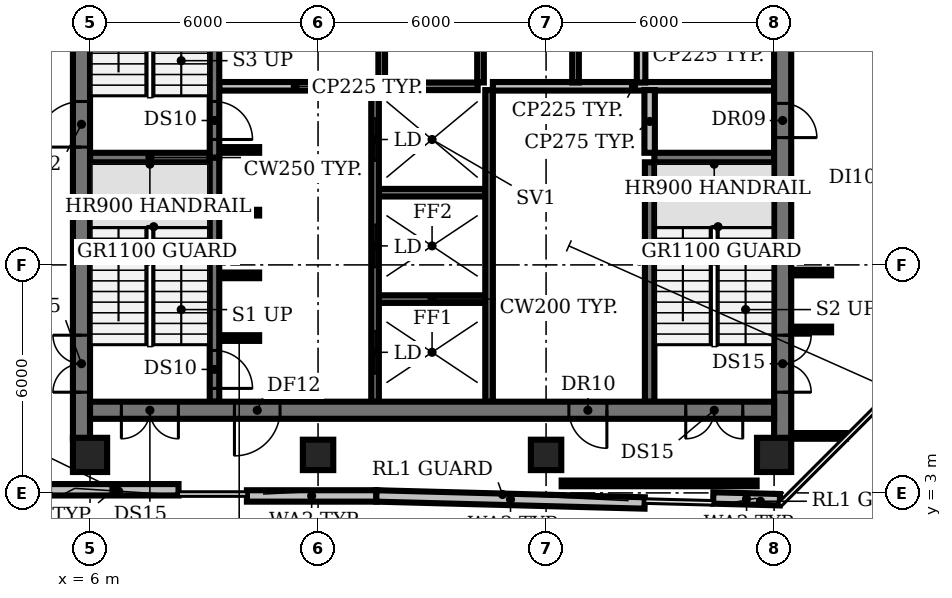
"""IFC4 building model, lengths in metres.
Left out: names, types, materials, properties, quantities, classifications, styles, units other than length and angle.
Written with IfcOpenShell. Run it as: python <this file> out.ifc"""

import sys

from ifc_helpers import new_model, si_unit, direction, frame, frame_2d, origin, origin_2d, place, context, subcontext, project, spatial, rectangle, circle, extrude, element, fill, save


model = new_model("IFC4")
c1 = context("Model", 3, precision=1e-05, world=origin(), true_north=direction((0.0, 1.0)))
c2 = subcontext(c1, "Body", "Model", "MODEL_VIEW")
j1 = project(units=[si_unit("LENGTHUNIT", "METRE"), si_unit("PLANEANGLEUNIT", "RADIAN")], contexts=[c1])
p1 = place(None, origin())
s1 = spatial("IfcSite", under=j1, at=p1, CompositionType="ELEMENT")
p2 = place(p1, origin())
s2 = spatial("IfcBuilding", under=s1, at=p2, CompositionType="ELEMENT")
p3 = place(p2, frame((0.0, 0.0, 234.8)))
s3 = spatial("IfcBuildingStorey", under=s2, at=p3, CompositionType="ELEMENT", Elevation=234.8)
p4 = place(p3, frame((6.0, 4.0, 0.0), z_axis=(0.0, 0.0, 1.0), x_axis=(1.0, 0.0, 0.0)))
e1 = element("IfcColumn", 1, at=p4, inside=s3, PredefinedType="COLUMN", context=c2, shape_type="SweptSolid", body=[
    extrude(circle(Radius=0.45, at=origin_2d()), origin(), (0.0, 0.0, 1.0), 3.85),
])
for number, where, z_axis, x_axis in (
    (2, (12.0, 4.0, 0.0), (0.0, 0.0, 1.0), (1.0, 0.0, 0.0)),
    (3, (18.0, 4.0, 0.0), (0.0, 0.0, 1.0), (1.0, 0.0, 0.0)),
):
    element("IfcColumn", number, at=place(p3, frame(where, z_axis=z_axis, x_axis=x_axis)), inside=s3, PredefinedType="COLUMN", context=c2, shape_type="SweptSolid", body=[
        extrude(rectangle(XDim=0.8, YDim=0.8, at=origin_2d()), origin(), (0.0, 0.0, 1.0), 3.85),
    ])
p5 = place(p3, frame((24.0, 4.0, 0.0), z_axis=(0.0, 0.0, 1.0), x_axis=(1.0, 0.0, 0.0)))
e4 = element("IfcColumn", 4, at=p5, inside=s3, PredefinedType="COLUMN", context=c2, shape_type="SweptSolid", body=[
    extrude(circle(Radius=0.45, at=origin_2d()), origin(), (0.0, 0.0, 1.0), 3.85),
])
p6 = place(p3, frame((4.921, 3.083, 0.0), z_axis=(0.0, 0.0, 1.0), x_axis=(1.0, 0.0, 0.0)))
e5 = element("IfcWall", 5, at=p6, inside=s3, PredefinedType="SOLIDWALL", context=c2, shape_type="SweptSolid", body=[
    extrude(rectangle(XDim=3.407, YDim=0.3, at=frame_2d((1.704, 0.0))), origin(), (0.0, 0.0, 1.0), 3.85),
])
p7 = place(p3, frame((10.128, 2.92, 0.0), z_axis=(0.0, 0.0, 1.0), x_axis=(1.0, 0.0, 0.0)))
e6 = element("IfcWall", 6, at=p7, inside=s3, PredefinedType="SOLIDWALL", context=c2, shape_type="SweptSolid", body=[
    extrude(rectangle(XDim=3.407, YDim=0.3, at=frame_2d((1.704, 0.0))), origin(), (0.0, 0.0, 1.0), 3.85),
])
p8 = place(p3, frame((13.534, 2.92, 0.0), z_axis=(0.0, 0.0, 1.0), x_axis=(0.999657569766, -0.026167598475, 0.0)))
e7 = element("IfcWall", 7, at=p8, inside=s3, PredefinedType="SOLIDWALL", context=c2, shape_type="SweptSolid", body=[
    extrude(rectangle(XDim=7.063, YDim=0.3, at=frame_2d((3.531, 0.0))), origin(), (0.0, 0.0, 1.0), 3.85),
])
p9 = place(p3, frame((22.398, 2.867, 0.0), z_axis=(0.0, 0.0, 1.0), x_axis=(0.999657665307, -0.026163948361, 0.0)))
e8 = element("IfcWall", 8, at=p9, inside=s3, PredefinedType="SOLIDWALL", context=c2, shape_type="SweptSolid", body=[
    extrude(rectangle(XDim=1.754, YDim=0.3, at=frame_2d((0.877, 0.0))), origin(), (0.0, 0.0, 1.0), 3.85),
])
p10 = place(p3, frame((9.4, 7.075, 0.0), z_axis=(0.0, 0.0, 1.0), x_axis=(1.0, 0.0, 0.0)))
e9 = element("IfcWall", 9, at=p10, inside=s3, PredefinedType="SHEAR", context=c2, shape_type="SweptSolid", body=[
    extrude(rectangle(XDim=1.05, YDim=0.15, at=frame_2d((0.525, 0.0))), origin(), (0.0, 0.0, 1.0), 3.85),
])
p11 = place(p3, frame((13.6, 8.1, 0.0), z_axis=(0.0, 0.0, 1.0), x_axis=(1.0, 0.0, 0.0)))
e10 = element("IfcWall", 10, at=p11, inside=s3, PredefinedType="SHEAR", context=c2, shape_type="SweptSolid", body=[
    extrude(rectangle(XDim=2.8, YDim=0.2, at=frame_2d((1.4, 0.0))), origin(), (0.0, 0.0, 1.0), 3.85),
])
for number, where, z_axis, x_axis in (
    (11, (9.4, 8.725, 0.0), (0.0, 0.0, 1.0), (1.0, 0.0, 0.0)),
    (12, (9.4, 10.375, 0.0), (0.0, 0.0, 1.0), (1.0, 0.0, 0.0)),
):
    element("IfcWall", number, at=place(p3, frame(where, z_axis=z_axis, x_axis=x_axis)), inside=s3, PredefinedType="SHEAR", context=c2, shape_type="SweptSolid", body=[
        extrude(rectangle(XDim=1.05, YDim=0.15, at=frame_2d((0.525, 0.0))), origin(), (0.0, 0.0, 1.0), 3.85),
    ])
p12 = place(p3, frame((13.6, 10.9, 0.0), z_axis=(0.0, 0.0, 1.0), x_axis=(1.0, 0.0, 0.0)))
e13 = element("IfcWall", 13, at=p12, inside=s3, PredefinedType="SHEAR", context=c2, shape_type="SweptSolid", body=[
    extrude(rectangle(XDim=2.8, YDim=0.2, at=frame_2d((1.4, 0.0))), origin(), (0.0, 0.0, 1.0), 3.85),
])
for number, where, z_axis, x_axis in (
    (14, (6.0, 11.825, 0.0), (0.0, 0.0, 1.0), (1.0, 0.0, 0.0)),
    (15, (20.85, 11.825, 0.0), (0.0, 0.0, 1.0), (1.0, 0.0, 0.0)),
):
    element("IfcWall", number, at=place(p3, frame(where, z_axis=z_axis, x_axis=x_axis)), inside=s3, PredefinedType="SHEAR", context=c2, shape_type="SweptSolid", body=[
        extrude(rectangle(XDim=3.15, YDim=0.25, at=frame_2d((1.575, 0.0))), origin(), (0.0, 0.0, 1.0), 3.85),
    ])
p13 = place(p3, frame((9.4, 12.025, 0.0), z_axis=(0.0, 0.0, 1.0), x_axis=(1.0, 0.0, 0.0)))
e16 = element("IfcWall", 16, at=p13, inside=s3, PredefinedType="SHEAR", context=c2, shape_type="SweptSolid", body=[
    extrude(rectangle(XDim=1.05, YDim=0.15, at=frame_2d((0.525, 0.0))), origin(), (0.0, 0.0, 1.0), 3.85),
])
p14 = place(p3, frame((9.4, 13.7, 0.0), z_axis=(0.0, 0.0, 1.0), x_axis=(1.0, 0.0, 0.0)))
e17 = element("IfcWall", 17, at=p14, inside=s3, PredefinedType="PARTITIONING", context=c2, shape_type="SweptSolid", body=[
    extrude(rectangle(XDim=4.0, YDim=0.225, at=frame_2d((2.0, 0.0))), origin(), (0.0, 0.0, 1.0), 3.85),
])
p15 = place(p3, frame((13.75, 13.7, 0.0), z_axis=(0.0, 0.0, 1.0), x_axis=(1.0, 0.0, 0.0)))
e18 = element("IfcWall", 18, at=p15, inside=s3, PredefinedType="SHEAR", context=c2, shape_type="SweptSolid", body=[
    extrude(rectangle(XDim=2.45, YDim=0.2, at=frame_2d((1.225, 0.0))), origin(), (0.0, 0.0, 1.0), 3.85),
])
p16 = place(p3, frame((16.6, 13.7, 0.0), z_axis=(0.0, 0.0, 1.0), x_axis=(1.0, 0.0, 0.0)))
e19 = element("IfcWall", 19, at=p16, inside=s3, PredefinedType="PARTITIONING", context=c2, shape_type="SweptSolid", body=[
    extrude(rectangle(XDim=7.4, YDim=0.225, at=frame_2d((3.7, 0.0))), origin(), (0.0, 0.0, 1.0), 3.85),
])
p17 = place(p3, frame((9.275, 11.825, 0.0), z_axis=(0.0, 0.0, 1.0), x_axis=(0.0, -1.0, 0.0)))
e20 = element("IfcWall", 20, at=p17, inside=s3, PredefinedType="SHEAR", context=c2, shape_type="SweptSolid", body=[
    extrude(rectangle(XDim=6.425, YDim=0.25, at=frame_2d((3.212, 0.0))), origin(), (0.0, 0.0, 1.0), 3.85),
])
p18 = place(p17, frame((5.075, 0.0, 0.0)))
e21 = element("IfcOpeningElement", 21, at=p18, cuts=e20, PredefinedType="OPENING", context=c2, shape_type="SweptSolid", body=[
    extrude(rectangle(XDim=1.0, YDim=2.1, at=frame_2d((0.5, 1.05))), frame((0.0, 0.135, 0.0), z_axis=(0.0, -1.0, 0.0), x_axis=(1.0, 0.0, 0.0)), (0.0, 0.0, 1.0), 0.27),
])
p19 = place(p3, frame((9.275, 18.375, 0.0), z_axis=(0.0, 0.0, 1.0), x_axis=(0.0, -1.0, 0.0)))
e22 = element("IfcWall", 22, at=p19, inside=s3, PredefinedType="SHEAR", context=c2, shape_type="SweptSolid", body=[
    extrude(rectangle(XDim=6.55, YDim=0.25, at=frame_2d((3.275, 0.0))), origin(), (0.0, 0.0, 1.0), 3.85),
])
p20 = place(p19, frame((5.075, 0.0, 0.0)))
e23 = element("IfcOpeningElement", 23, at=p20, cuts=e22, PredefinedType="OPENING", context=c2, shape_type="SweptSolid", body=[
    extrude(rectangle(XDim=1.0, YDim=2.1, at=frame_2d((0.5, 1.05))), frame((0.0, 0.135, 0.0), z_axis=(0.0, -1.0, 0.0), x_axis=(1.0, 0.0, 0.0)), (0.0, 0.0, 1.0), 0.27),
])
p21 = place(p3, frame((13.5, 5.4, 0.0), z_axis=(0.0, 0.0, 1.0), x_axis=(0.0, 1.0, 0.0)))
e24 = element("IfcWall", 24, at=p21, inside=s3, PredefinedType="SHEAR", context=c2, shape_type="SweptSolid", body=[
    extrude(rectangle(XDim=8.2, YDim=0.2, at=frame_2d((4.1, 0.0))), origin(), (0.0, 0.0, 1.0), 3.85),
])
p22 = place(p21, frame((0.75, 0.0, 0.0)))
e25 = element("IfcOpeningElement", 25, at=p22, cuts=e24, PredefinedType="OPENING", context=c2, shape_type="SweptSolid", body=[
    extrude(rectangle(XDim=1.1, YDim=2.1, at=frame_2d((0.55, 1.05))), frame((0.0, 0.11, 0.0), z_axis=(0.0, -1.0, 0.0), x_axis=(1.0, 0.0, 0.0)), (0.0, 0.0, 1.0), 0.22),
])
p23 = place(p21, frame((3.55, 0.0, 0.0)))
e26 = element("IfcOpeningElement", 26, at=p23, cuts=e24, PredefinedType="OPENING", context=c2, shape_type="SweptSolid", body=[
    extrude(rectangle(XDim=1.1, YDim=2.1, at=frame_2d((0.55, 1.05))), frame((0.0, 0.11, 0.0), z_axis=(0.0, -1.0, 0.0), x_axis=(1.0, 0.0, 0.0)), (0.0, 0.0, 1.0), 0.22),
])
p24 = place(p21, frame((6.35, 0.0, 0.0)))
e27 = element("IfcOpeningElement", 27, at=p24, cuts=e24, PredefinedType="OPENING", context=c2, shape_type="SweptSolid", body=[
    extrude(rectangle(XDim=1.1, YDim=2.1, at=frame_2d((0.55, 1.05))), frame((0.0, 0.11, 0.0), z_axis=(0.0, -1.0, 0.0), x_axis=(1.0, 0.0, 0.0)), (0.0, 0.0, 1.0), 0.22),
])
for number, where, z_axis, x_axis in (
    (28, (13.675, 13.8, 0.0), (0.0, 0.0, 1.0), (0.0, 1.0, 0.0)),
    (29, (16.275, 13.8, 0.0), (0.0, 0.0, 1.0), (0.0, 1.0, 0.0)),
):
    element("IfcWall", number, at=place(p3, frame(where, z_axis=z_axis, x_axis=x_axis)), inside=s3, PredefinedType="PARTITIONING", context=c2, shape_type="SweptSolid", body=[
        extrude(rectangle(XDim=2.6, YDim=0.175, at=frame_2d((1.3, 0.0))), origin(), (0.0, 0.0, 1.0), 3.85),
    ])
p25 = place(p3, frame((16.5, 5.4, 0.0), z_axis=(0.0, 0.0, 1.0), x_axis=(0.0, 1.0, 0.0)))
e30 = element("IfcWall", 30, at=p25, inside=s3, PredefinedType="SHEAR", context=c2, shape_type="SweptSolid", body=[
    extrude(rectangle(XDim=8.2, YDim=0.2, at=frame_2d((4.1, 0.0))), origin(), (0.0, 0.0, 1.0), 3.85),
])
p26 = place(p3, frame((18.775, 13.8, 0.0), z_axis=(0.0, 0.0, 1.0), x_axis=(0.0, 1.0, 0.0)))
e31 = element("IfcWall", 31, at=p26, inside=s3, PredefinedType="PARTITIONING", context=c2, shape_type="SweptSolid", body=[
    extrude(rectangle(XDim=2.6, YDim=0.175, at=frame_2d((1.3, 0.0))), origin(), (0.0, 0.0, 1.0), 3.85),
])
p27 = place(p3, frame((20.5, 13.8, 0.0), z_axis=(0.0, 0.0, 1.0), x_axis=(0.0, 1.0, 0.0)))
e32 = element("IfcWall", 32, at=p27, inside=s3, PredefinedType="PARTITIONING", context=c2, shape_type="SweptSolid", body=[
    extrude(rectangle(XDim=2.6, YDim=0.225, at=frame_2d((1.3, 0.0))), origin(), (0.0, 0.0, 1.0), 3.85),
])
p28 = place(p3, frame((20.725, 5.4, 0.0), z_axis=(0.0, 0.0, 1.0), x_axis=(0.0, 1.0, 0.0)))
e33 = element("IfcWall", 33, at=p28, inside=s3, PredefinedType="SHEAR", context=c2, shape_type="SweptSolid", body=[
    extrude(rectangle(XDim=6.3, YDim=0.25, at=frame_2d((3.15, 0.0))), origin(), (0.0, 0.0, 1.0), 3.85),
])
p29 = place(p3, frame((20.725, 11.95, 0.0), z_axis=(0.0, 0.0, 1.0), x_axis=(0.0, 1.0, 0.0)))
e34 = element("IfcWall", 34, at=p29, inside=s3, PredefinedType="PARTITIONING", context=c2, shape_type="SweptSolid", body=[
    extrude(rectangle(XDim=1.65, YDim=0.275, at=frame_2d((0.825, 0.0))), origin(), (0.0, 0.0, 1.0), 3.85),
])
p30 = place(p3, frame((5.775, 4.42, 0.0), z_axis=(0.0, 0.0, 1.0), x_axis=(0.0, 1.0, 0.0)))
e35 = element("IfcWall", 35, at=p30, inside=s3, PredefinedType="SHEAR", context=c2, shape_type="SweptSolid", body=[
    extrude(rectangle(XDim=20.83, YDim=0.45, at=frame_2d((10.415, 0.0))), origin(), (0.0, 0.0, 1.0), 3.85),
])
p31 = place(p30, frame((1.23, 0.0, 0.0)))
e36 = element("IfcOpeningElement", 36, at=p31, cuts=e35, PredefinedType="OPENING", context=c2, shape_type="SweptSolid", body=[
    extrude(rectangle(XDim=1.5, YDim=2.1, at=frame_2d((0.75, 1.05))), frame((0.0, 0.235, 0.0), z_axis=(0.0, -1.0, 0.0), x_axis=(1.0, 0.0, 0.0)), (0.0, 0.0, 1.0), 0.47),
])
p32 = place(p30, frame((7.68, 0.0, 0.0)))
e37 = element("IfcOpeningElement", 37, at=p32, cuts=e35, PredefinedType="OPENING", context=c2, shape_type="SweptSolid", body=[
    extrude(rectangle(XDim=1.2, YDim=2.1, at=frame_2d((0.6, 1.05))), frame((0.0, 0.235, 0.0), z_axis=(0.0, -1.0, 0.0), x_axis=(1.0, 0.0, 0.0)), (0.0, 0.0, 1.0), 0.47),
])
p33 = place(p30, frame((14.23, 0.0, 0.0)))
e38 = element("IfcOpeningElement", 38, at=p33, cuts=e35, PredefinedType="OPENING", context=c2, shape_type="SweptSolid", body=[
    extrude(rectangle(XDim=1.2, YDim=2.1, at=frame_2d((0.6, 1.05))), frame((0.0, 0.235, 0.0), z_axis=(0.0, -1.0, 0.0), x_axis=(1.0, 0.0, 0.0)), (0.0, 0.0, 1.0), 0.47),
])
p34 = place(p3, frame((24.225, 25.25, 0.0), z_axis=(0.0, 0.0, 1.0), x_axis=(0.0, -1.0, 0.0)))
e39 = element("IfcWall", 39, at=p34, inside=s3, PredefinedType="SHEAR", context=c2, shape_type="SweptSolid", body=[
    extrude(rectangle(XDim=20.83, YDim=0.45, at=frame_2d((10.415, 0.0))), origin(), (0.0, 0.0, 1.0), 3.85),
])
p35 = place(p34, frame((18.1, 0.0, 0.0)))
e40 = element("IfcOpeningElement", 40, at=p35, cuts=e39, PredefinedType="OPENING", context=c2, shape_type="SweptSolid", body=[
    extrude(rectangle(XDim=1.5, YDim=2.1, at=frame_2d((0.75, 1.05))), frame((0.0, 0.235, 0.0), z_axis=(0.0, -1.0, 0.0), x_axis=(1.0, 0.0, 0.0)), (0.0, 0.0, 1.0), 0.47),
])
p36 = place(p34, frame((12.0, 0.0, 0.0)))
e41 = element("IfcOpeningElement", 41, at=p36, cuts=e39, PredefinedType="OPENING", context=c2, shape_type="SweptSolid", body=[
    extrude(rectangle(XDim=0.9, YDim=2.1, at=frame_2d((0.45, 1.05))), frame((0.0, 0.235, 0.0), z_axis=(0.0, -1.0, 0.0), x_axis=(1.0, 0.0, 0.0)), (0.0, 0.0, 1.0), 0.47),
])
p37 = place(p34, frame((6.0, 0.0, 0.0)))
e42 = element("IfcOpeningElement", 42, at=p37, cuts=e39, PredefinedType="OPENING", context=c2, shape_type="SweptSolid", body=[
    extrude(rectangle(XDim=2.0, YDim=2.1, at=frame_2d((1.0, 1.05))), frame((0.0, 0.235, 0.0), z_axis=(0.0, -1.0, 0.0), x_axis=(1.0, 0.0, 0.0)), (0.0, 0.0, 1.0), 0.47),
])
p38 = place(p3, frame((24.0, 5.175, 0.0), z_axis=(0.0, 0.0, 1.0), x_axis=(-1.0, 0.0, 0.0)))
e43 = element("IfcWall", 43, at=p38, inside=s3, PredefinedType="SHEAR", context=c2, shape_type="SweptSolid", body=[
    extrude(rectangle(XDim=18.0, YDim=0.45, at=frame_2d((9.0, 0.0))), origin(), (0.0, 0.0, 1.0), 3.85),
])
p39 = place(p38, frame((0.825, 0.0, 0.0)))
e44 = element("IfcOpeningElement", 44, at=p39, cuts=e43, PredefinedType="OPENING", context=c2, shape_type="SweptSolid", body=[
    extrude(rectangle(XDim=1.5, YDim=2.1, at=frame_2d((0.75, 1.05))), frame((0.0, 0.235, 0.0), z_axis=(0.0, -1.0, 0.0), x_axis=(1.0, 0.0, 0.0)), (0.0, 0.0, 1.0), 0.47),
])
p40 = place(p38, frame((15.675, 0.0, 0.0)))
e45 = element("IfcOpeningElement", 45, at=p40, cuts=e43, PredefinedType="OPENING", context=c2, shape_type="SweptSolid", body=[
    extrude(rectangle(XDim=1.5, YDim=2.1, at=frame_2d((0.75, 1.05))), frame((0.0, 0.235, 0.0), z_axis=(0.0, -1.0, 0.0), x_axis=(1.0, 0.0, 0.0)), (0.0, 0.0, 1.0), 0.47),
])
p41 = place(p38, frame((13.0, 0.0, 0.0)))
e46 = element("IfcOpeningElement", 46, at=p41, cuts=e43, PredefinedType="OPENING", context=c2, shape_type="SweptSolid", body=[
    extrude(rectangle(XDim=1.2, YDim=2.1, at=frame_2d((0.6, 1.05))), frame((0.0, 0.235, 0.0), z_axis=(0.0, -1.0, 0.0), x_axis=(1.0, 0.0, 0.0)), (0.0, 0.0, 1.0), 0.47),
])
p42 = place(p38, frame((4.4, 0.0, 0.0)))
e47 = element("IfcOpeningElement", 47, at=p42, cuts=e43, PredefinedType="OPENING", context=c2, shape_type="SweptSolid", body=[
    extrude(rectangle(XDim=1.0, YDim=2.1, at=frame_2d((0.5, 1.05))), frame((0.0, 0.235, 0.0), z_axis=(0.0, -1.0, 0.0), x_axis=(1.0, 0.0, 0.0)), (0.0, 0.0, 1.0), 0.47),
])
p43 = place(p3, frame((18.41, 3.25, 0.0), z_axis=(0.0, 0.0, 1.0), x_axis=(1.0, 0.0, 0.0)))
e48 = element("IfcWall", 48, at=p43, inside=s3, PredefinedType="PARTITIONING", context=c2, shape_type="SweptSolid", body=[
    extrude(rectangle(XDim=5.13, YDim=0.15, at=frame_2d((2.565, 0.0))), origin(), (0.0, 0.0, 1.0), 2.88),
])
for number, where, z_axis, x_axis in (
    (49, (24.45, 7.3, 0.0), (0.0, 0.0, 1.0), (1.0, 0.0, 0.0)),
    (50, (24.45, 8.8, 0.0), (0.0, 0.0, 1.0), (1.0, 0.0, 0.0)),
):
    element("IfcWall", number, at=place(p3, frame(where, z_axis=z_axis, x_axis=x_axis)), inside=s3, PredefinedType="PARTITIONING", context=c2, shape_type="SweptSolid", body=[
        extrude(rectangle(XDim=1.05, YDim=0.15, at=frame_2d((0.525, 0.0))), origin(), (0.0, 0.0, 1.0), 2.88),
    ])
p44 = place(p3, frame((24.55, 4.5, 0.0), z_axis=(0.0, 0.0, 1.0), x_axis=(1.0, 0.0, 0.0)))
e51 = element("IfcWall", 51, at=p44, inside=s3, PredefinedType="PARTITIONING", context=c2, shape_type="SweptSolid", body=[
    extrude(rectangle(XDim=1.34, YDim=0.15, at=frame_2d((0.67, 0.0))), origin(), (0.0, 0.0, 1.0), 2.88),
])
p45 = place(p18, origin())
e52 = element("IfcDoor", 52, at=p45, inside=s3, OperationType="SINGLE_SWING_RIGHT", PredefinedType="DOOR", context=c2, shape_type="SweptSolid", body=[
    extrude(rectangle(XDim=1.0, YDim=2.1, at=frame_2d((0.5, 1.05))), frame((0.0, 0.025, 0.0), z_axis=(0.0, -1.0, 0.0), x_axis=(1.0, 0.0, 0.0)), (0.0, 0.0, 1.0), 0.05),
])
fill(e21, e52)
p46 = place(p20, origin())
e53 = element("IfcDoor", 53, at=p46, inside=s3, OperationType="SINGLE_SWING_RIGHT", PredefinedType="DOOR", context=c2, shape_type="SweptSolid", body=[
    extrude(rectangle(XDim=1.0, YDim=2.1, at=frame_2d((0.5, 1.05))), frame((0.0, 0.025, 0.0), z_axis=(0.0, -1.0, 0.0), x_axis=(1.0, 0.0, 0.0)), (0.0, 0.0, 1.0), 0.05),
])
fill(e23, e53)
p47 = place(p22, origin())
e54 = element("IfcDoor", 54, at=p47, inside=s3, OperationType="DOUBLE_DOOR_SLIDING", PredefinedType="DOOR", context=c2, shape_type="SweptSolid", body=[
    extrude(rectangle(XDim=1.1, YDim=2.1, at=frame_2d((0.55, 1.05))), frame((0.0, 0.025, 0.0), z_axis=(0.0, -1.0, 0.0), x_axis=(1.0, 0.0, 0.0)), (0.0, 0.0, 1.0), 0.05),
])
fill(e25, e54)
p48 = place(p23, origin())
e55 = element("IfcDoor", 55, at=p48, inside=s3, OperationType="DOUBLE_DOOR_SLIDING", PredefinedType="DOOR", context=c2, shape_type="SweptSolid", body=[
    extrude(rectangle(XDim=1.1, YDim=2.1, at=frame_2d((0.55, 1.05))), frame((0.0, 0.025, 0.0), z_axis=(0.0, -1.0, 0.0), x_axis=(1.0, 0.0, 0.0)), (0.0, 0.0, 1.0), 0.05),
])
fill(e26, e55)
p49 = place(p24, origin())
e56 = element("IfcDoor", 56, at=p49, inside=s3, OperationType="DOUBLE_DOOR_SLIDING", PredefinedType="DOOR", context=c2, shape_type="SweptSolid", body=[
    extrude(rectangle(XDim=1.1, YDim=2.1, at=frame_2d((0.55, 1.05))), frame((0.0, 0.025, 0.0), z_axis=(0.0, -1.0, 0.0), x_axis=(1.0, 0.0, 0.0)), (0.0, 0.0, 1.0), 0.05),
])
fill(e27, e56)
p50 = place(p31, origin())
e57 = element("IfcDoor", 57, at=p50, inside=s3, OperationType="DOUBLE_DOOR_SINGLE_SWING", PredefinedType="DOOR", context=c2, shape_type="SweptSolid", body=[
    extrude(rectangle(XDim=1.5, YDim=2.1, at=frame_2d((0.75, 1.05))), frame((0.0, 0.025, 0.0), z_axis=(0.0, -1.0, 0.0), x_axis=(1.0, 0.0, 0.0)), (0.0, 0.0, 1.0), 0.05),
])
fill(e36, e57)
p51 = place(p32, origin())
e58 = element("IfcDoor", 58, at=p51, inside=s3, OperationType="SINGLE_SWING_LEFT", PredefinedType="DOOR", context=c2, shape_type="SweptSolid", body=[
    extrude(rectangle(XDim=1.2, YDim=2.1, at=frame_2d((0.6, 1.05))), frame((0.0, 0.025, 0.0), z_axis=(0.0, -1.0, 0.0), x_axis=(1.0, 0.0, 0.0)), (0.0, 0.0, 1.0), 0.05),
])
fill(e37, e58)
p52 = place(p35, origin())
e59 = element("IfcDoor", 59, at=p52, inside=s3, OperationType="DOUBLE_DOOR_SINGLE_SWING", PredefinedType="DOOR", context=c2, shape_type="SweptSolid", body=[
    extrude(rectangle(XDim=1.5, YDim=2.1, at=frame_2d((0.75, 1.05))), frame((0.0, 0.025, 0.0), z_axis=(0.0, -1.0, 0.0), x_axis=(1.0, 0.0, 0.0)), (0.0, 0.0, 1.0), 0.05),
])
fill(e40, e59)
p53 = place(p36, origin())
e60 = element("IfcDoor", 60, at=p53, inside=s3, OperationType="SINGLE_SWING_RIGHT", PredefinedType="DOOR", context=c2, shape_type="SweptSolid", body=[
    extrude(rectangle(XDim=0.9, YDim=2.1, at=frame_2d((0.45, 1.05))), frame((0.0, 0.025, 0.0), z_axis=(0.0, -1.0, 0.0), x_axis=(1.0, 0.0, 0.0)), (0.0, 0.0, 1.0), 0.05),
])
fill(e41, e60)
p54 = place(p39, origin())
e61 = element("IfcDoor", 61, at=p54, inside=s3, OperationType="DOUBLE_DOOR_SINGLE_SWING", PredefinedType="DOOR", context=c2, shape_type="SweptSolid", body=[
    extrude(rectangle(XDim=1.5, YDim=2.1, at=frame_2d((0.75, 1.05))), frame((0.0, 0.025, 0.0), z_axis=(0.0, -1.0, 0.0), x_axis=(1.0, 0.0, 0.0)), (0.0, 0.0, 1.0), 0.05),
])
fill(e44, e61)
p55 = place(p40, origin())
e62 = element("IfcDoor", 62, at=p55, inside=s3, OperationType="DOUBLE_DOOR_SINGLE_SWING", PredefinedType="DOOR", context=c2, shape_type="SweptSolid", body=[
    extrude(rectangle(XDim=1.5, YDim=2.1, at=frame_2d((0.75, 1.05))), frame((0.0, 0.025, 0.0), z_axis=(0.0, -1.0, 0.0), x_axis=(1.0, 0.0, 0.0)), (0.0, 0.0, 1.0), 0.05),
])
fill(e45, e62)
p56 = place(p41, origin())
e63 = element("IfcDoor", 63, at=p56, inside=s3, OperationType="SINGLE_SWING_RIGHT", PredefinedType="DOOR", context=c2, shape_type="SweptSolid", body=[
    extrude(rectangle(XDim=1.2, YDim=2.1, at=frame_2d((0.6, 1.05))), frame((0.0, 0.025, 0.0), z_axis=(0.0, -1.0, 0.0), x_axis=(1.0, 0.0, 0.0)), (0.0, 0.0, 1.0), 0.05),
])
fill(e46, e63)
p57 = place(p42, origin())
e64 = element("IfcDoor", 64, at=p57, inside=s3, OperationType="SINGLE_SWING_LEFT", PredefinedType="DOOR", context=c2, shape_type="SweptSolid", body=[
    extrude(rectangle(XDim=1.0, YDim=2.1, at=frame_2d((0.5, 1.05))), frame((0.0, 0.025, 0.0), z_axis=(0.0, -1.0, 0.0), x_axis=(1.0, 0.0, 0.0)), (0.0, 0.0, 1.0), 0.05),
])
fill(e47, e64)
save(model, sys.argv[1])
